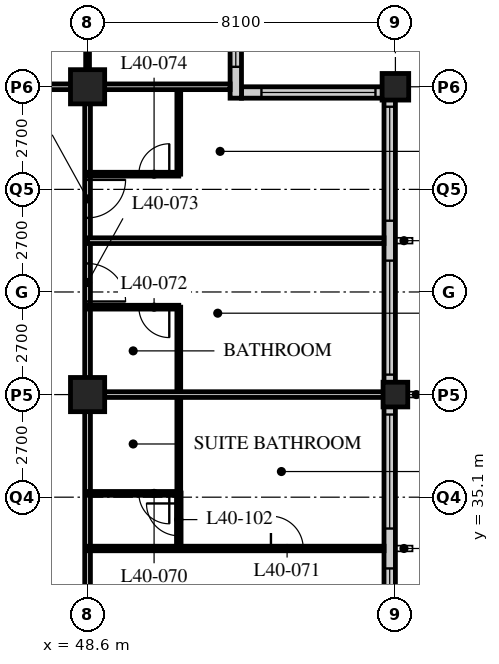
"""IFC4 building model, lengths in metres.
Left out: names, types, materials, properties, quantities, classifications, styles, units other than length and angle.
Written with IfcOpenShell. Run it as: python <this file> out.ifc"""

import sys

from ifc_helpers import new_model, si_unit, direction, frame, frame_2d, origin, origin_2d, place, context, subcontext, project, spatial, rectangle, hollow_rectangle, extrude, element, fill, save


model = new_model("IFC4")
c1 = context("Model", 3, precision=1e-05, world=origin(), true_north=direction((0.0, 1.0)))
c2 = subcontext(c1, "Body", "Model", "MODEL_VIEW")
j1 = project(units=[si_unit("LENGTHUNIT", "METRE"), si_unit("PLANEANGLEUNIT", "RADIAN")], contexts=[c1])
p1 = place(None, origin())
s1 = spatial("IfcSite", under=j1, at=p1, CompositionType="ELEMENT")
p2 = place(p1, origin())
s2 = spatial("IfcBuilding", under=s1, at=p2, CompositionType="ELEMENT")
p3 = place(p2, frame((0.0, 0.0, 154.4)))
s3 = spatial("IfcBuildingStorey", under=s2, at=p3, CompositionType="ELEMENT", Elevation=154.4)
for number, where, z_axis, x_axis in (
    (1, (48.6, 37.8, 0.0), (0.0, 0.0, 1.0), (1.0, 0.0, 0.0)),
    (2, (48.6, 45.9, 0.0), (0.0, 0.0, 1.0), (1.0, 0.0, 0.0)),
):
    element("IfcColumn", number, at=place(p3, frame(where, z_axis=z_axis, x_axis=x_axis)), inside=s3, PredefinedType="COLUMN", context=c2, shape_type="SweptSolid", body=[
        extrude(hollow_rectangle(XDim=0.9, YDim=0.9, WallThickness=0.1, at=origin_2d()), origin(), (0.0, 0.0, 1.0), 3.4),
    ])
p4 = place(p3, frame((56.7, 37.8, 0.0), z_axis=(0.0, 0.0, 1.0), x_axis=(1.0, 0.0, 0.0)))
e3 = element("IfcColumn", 3, at=p4, inside=s3, PredefinedType="COLUMN", context=c2, shape_type="SweptSolid", body=[
    extrude(hollow_rectangle(XDim=0.65, YDim=0.65, WallThickness=0.055, at=origin_2d()), origin(), (0.0, 0.0, 1.0), 3.4),
])
p5 = place(p3, frame((56.7, 45.9, 0.0), z_axis=(0.0, 0.0, 1.0), x_axis=(1.0, 0.0, 0.0)))
e4 = element("IfcColumn", 4, at=p5, inside=s3, PredefinedType="COLUMN", context=c2, shape_type="SweptSolid", body=[
    extrude(hollow_rectangle(XDim=0.7, YDim=0.7, WallThickness=0.07, at=origin_2d()), origin(), (0.0, 0.0, 1.0), 3.4),
])
p6 = place(p3, frame((56.55, 13.8, 0.0), z_axis=(0.0, 0.0, 1.0), x_axis=(0.0, 1.0, 0.0)))
e5 = element("IfcWall", 5, at=p6, inside=s3, PredefinedType="SOLIDWALL", context=c2, shape_type="SweptSolid", body=[
    extrude(rectangle(XDim=32.1, YDim=0.3, at=frame_2d((16.05, 0.0))), origin(), (0.0, 0.0, 1.0), 2.15),
])
p7 = place(p6, frame((0.225, 0.0, 0.9)))
e6 = element("IfcOpeningElement", 6, at=p7, cuts=e5, PredefinedType="OPENING", context=c2, shape_type="SweptSolid", body=[
    extrude(rectangle(XDim=3.0, YDim=1.2, at=frame_2d((1.5, 0.6))), frame((0.0, 0.16, 0.0), z_axis=(0.0, -1.0, 0.0), x_axis=(1.0, 0.0, 0.0)), (0.0, 0.0, 1.0), 0.32),
])
p8 = place(p6, frame((4.275, 0.0, 0.9)))
e7 = element("IfcOpeningElement", 7, at=p8, cuts=e5, PredefinedType="OPENING", context=c2, shape_type="SweptSolid", body=[
    extrude(rectangle(XDim=3.0, YDim=1.2, at=frame_2d((1.5, 0.6))), frame((0.0, 0.16, 0.0), z_axis=(0.0, -1.0, 0.0), x_axis=(1.0, 0.0, 0.0)), (0.0, 0.0, 1.0), 0.32),
])
p9 = place(p6, frame((8.325, 0.0, 0.9)))
e8 = element("IfcOpeningElement", 8, at=p9, cuts=e5, PredefinedType="OPENING", context=c2, shape_type="SweptSolid", body=[
    extrude(rectangle(XDim=3.0, YDim=1.2, at=frame_2d((1.5, 0.6))), frame((0.0, 0.16, 0.0), z_axis=(0.0, -1.0, 0.0), x_axis=(1.0, 0.0, 0.0)), (0.0, 0.0, 1.0), 0.32),
])
p10 = place(p6, frame((12.375, 0.0, 0.9)))
e9 = element("IfcOpeningElement", 9, at=p10, cuts=e5, PredefinedType="OPENING", context=c2, shape_type="SweptSolid", body=[
    extrude(rectangle(XDim=3.0, YDim=1.2, at=frame_2d((1.5, 0.6))), frame((0.0, 0.16, 0.0), z_axis=(0.0, -1.0, 0.0), x_axis=(1.0, 0.0, 0.0)), (0.0, 0.0, 1.0), 0.32),
])
p11 = place(p6, frame((16.425, 0.0, 0.9)))
e10 = element("IfcOpeningElement", 10, at=p11, cuts=e5, PredefinedType="OPENING", context=c2, shape_type="SweptSolid", body=[
    extrude(rectangle(XDim=3.0, YDim=1.2, at=frame_2d((1.5, 0.6))), frame((0.0, 0.16, 0.0), z_axis=(0.0, -1.0, 0.0), x_axis=(1.0, 0.0, 0.0)), (0.0, 0.0, 1.0), 0.32),
])
p12 = place(p6, frame((20.475, 0.0, 0.9)))
e11 = element("IfcOpeningElement", 11, at=p12, cuts=e5, PredefinedType="OPENING", context=c2, shape_type="SweptSolid", body=[
    extrude(rectangle(XDim=3.0, YDim=1.2, at=frame_2d((1.5, 0.6))), frame((0.0, 0.16, 0.0), z_axis=(0.0, -1.0, 0.0), x_axis=(1.0, 0.0, 0.0)), (0.0, 0.0, 1.0), 0.32),
])
p13 = place(p6, frame((24.525, 0.0, 0.9)))
e12 = element("IfcOpeningElement", 12, at=p13, cuts=e5, PredefinedType="OPENING", context=c2, shape_type="SweptSolid", body=[
    extrude(rectangle(XDim=3.0, YDim=1.2, at=frame_2d((1.5, 0.6))), frame((0.0, 0.16, 0.0), z_axis=(0.0, -1.0, 0.0), x_axis=(1.0, 0.0, 0.0)), (0.0, 0.0, 1.0), 0.32),
])
p14 = place(p6, frame((28.575, 0.0, 0.9)))
e13 = element("IfcOpeningElement", 13, at=p14, cuts=e5, PredefinedType="OPENING", context=c2, shape_type="SweptSolid", body=[
    extrude(rectangle(XDim=3.0, YDim=1.2, at=frame_2d((1.5, 0.6))), frame((0.0, 0.16, 0.0), z_axis=(0.0, -1.0, 0.0), x_axis=(1.0, 0.0, 0.0)), (0.0, 0.0, 1.0), 0.32),
])
p15 = place(p3, frame((56.4, 45.75, 0.0), z_axis=(0.0, 0.0, 1.0), x_axis=(-1.0, 0.0, 0.0)))
e14 = element("IfcWall", 14, at=p15, inside=s3, PredefinedType="SOLIDWALL", context=c2, shape_type="SweptSolid", body=[
    extrude(rectangle(XDim=3.75, YDim=0.3, at=frame_2d((1.875, 0.0))), origin(), (0.0, 0.0, 1.0), 2.15),
])
p16 = place(p15, frame((0.225, 0.0, 0.9)))
e15 = element("IfcOpeningElement", 15, at=p16, cuts=e14, PredefinedType="OPENING", context=c2, shape_type="SweptSolid", body=[
    extrude(rectangle(XDim=3.0, YDim=1.2, at=frame_2d((1.5, 0.6))), frame((0.0, 0.16, 0.0), z_axis=(0.0, -1.0, 0.0), x_axis=(1.0, 0.0, 0.0)), (0.0, 0.0, 1.0), 0.32),
])
p17 = place(p3, frame((52.5, 45.6, 0.0), z_axis=(0.0, 0.0, 1.0), x_axis=(0.0, 1.0, 0.0)))
e16 = element("IfcWall", 16, at=p17, inside=s3, PredefinedType="SOLIDWALL", context=c2, shape_type="SweptSolid", body=[
    extrude(rectangle(XDim=4.35, YDim=0.3, at=frame_2d((2.175, 0.0))), origin(), (0.0, 0.0, 1.0), 2.45),
])
p18 = place(p17, frame((0.825, 0.0, 0.9)))
e17 = element("IfcOpeningElement", 17, at=p18, cuts=e16, PredefinedType="OPENING", context=c2, shape_type="SweptSolid", body=[
    extrude(rectangle(XDim=3.0, YDim=1.2, at=frame_2d((1.5, 0.6))), frame((0.0, 0.16, 0.0), z_axis=(0.0, -1.0, 0.0), x_axis=(1.0, 0.0, 0.0)), (0.0, 0.0, 1.0), 0.32),
])
p19 = place(p3, frame((8.1, 45.9, 0.0), z_axis=(0.0, 0.0, 1.0), x_axis=(1.0, 0.0, 0.0)))
e18 = element("IfcWall", 18, at=p19, inside=s3, PredefinedType="PARTITIONING", context=c2, shape_type="SweptSolid", body=[
    extrude(rectangle(XDim=40.5, YDim=0.15, at=frame_2d((20.25, 0.0))), origin(), (0.0, 0.0, 1.0), 2.15),
])
p20 = place(p19, frame((9.625, 0.0, 0.0)))
e19 = element("IfcOpeningElement", 19, at=p20, cuts=e18, PredefinedType="OPENING", context=c2, shape_type="SweptSolid", body=[
    extrude(rectangle(XDim=1.0, YDim=2.1, at=frame_2d((0.5, 1.05))), frame((0.0, 0.085, 0.0), z_axis=(0.0, -1.0, 0.0), x_axis=(1.0, 0.0, 0.0)), (0.0, 0.0, 1.0), 0.17),
])
p21 = place(p19, frame((21.775, 0.0, 0.0)))
e20 = element("IfcOpeningElement", 20, at=p21, cuts=e18, PredefinedType="OPENING", context=c2, shape_type="SweptSolid", body=[
    extrude(rectangle(XDim=1.0, YDim=2.1, at=frame_2d((0.5, 1.05))), frame((0.0, 0.085, 0.0), z_axis=(0.0, -1.0, 0.0), x_axis=(1.0, 0.0, 0.0)), (0.0, 0.0, 1.0), 0.17),
])
p22 = place(p19, frame((28.95, 0.0, 0.0)))
e21 = element("IfcOpeningElement", 21, at=p22, cuts=e18, PredefinedType="OPENING", context=c2, shape_type="SweptSolid", body=[
    extrude(rectangle(XDim=1.0, YDim=2.1, at=frame_2d((0.5, 1.05))), frame((0.0, 0.085, 0.0), z_axis=(0.0, -1.0, 0.0), x_axis=(1.0, 0.0, 0.0)), (0.0, 0.0, 1.0), 0.17),
])
p23 = place(p19, frame((34.85, 0.0, 0.0)))
e22 = element("IfcOpeningElement", 22, at=p23, cuts=e18, PredefinedType="OPENING", context=c2, shape_type="SweptSolid", body=[
    extrude(rectangle(XDim=1.0, YDim=2.1, at=frame_2d((0.5, 1.05))), frame((0.0, 0.085, 0.0), z_axis=(0.0, -1.0, 0.0), x_axis=(1.0, 0.0, 0.0)), (0.0, 0.0, 1.0), 0.17),
])
p24 = place(p19, frame((36.875, 0.0, 0.0)))
e23 = element("IfcOpeningElement", 23, at=p24, cuts=e18, PredefinedType="OPENING", context=c2, shape_type="SweptSolid", body=[
    extrude(rectangle(XDim=1.0, YDim=2.1, at=frame_2d((0.5, 1.05))), frame((0.0, 0.085, 0.0), z_axis=(0.0, -1.0, 0.0), x_axis=(1.0, 0.0, 0.0)), (0.0, 0.0, 1.0), 0.17),
])
p25 = place(p19, frame((2.625, 0.0, 0.0)))
e24 = element("IfcOpeningElement", 24, at=p25, cuts=e18, PredefinedType="OPENING", context=c2, shape_type="SweptSolid", body=[
    extrude(rectangle(XDim=1.0, YDim=2.1, at=frame_2d((0.5, 1.05))), frame((0.0, 0.085, 0.0), z_axis=(0.0, -1.0, 0.0), x_axis=(1.0, 0.0, 0.0)), (0.0, 0.0, 1.0), 0.17),
])
p26 = place(p3, frame((48.6, 17.55, 0.0), z_axis=(0.0, 0.0, 1.0), x_axis=(0.0, 1.0, 0.0)))
e25 = element("IfcWall", 25, at=p26, inside=s3, PredefinedType="PARTITIONING", context=c2, shape_type="SweptSolid", body=[
    extrude(rectangle(XDim=28.35, YDim=0.15, at=frame_2d((14.175, 0.0))), origin(), (0.0, 0.0, 1.0), 2.15),
])
p27 = place(p26, frame((0.3, 0.0, 0.0)))
e26 = element("IfcOpeningElement", 26, at=p27, cuts=e25, PredefinedType="OPENING", context=c2, shape_type="SweptSolid", body=[
    extrude(rectangle(XDim=1.0, YDim=2.1, at=frame_2d((0.5, 1.05))), frame((0.0, 0.085, 0.0), z_axis=(0.0, -1.0, 0.0), x_axis=(1.0, 0.0, 0.0)), (0.0, 0.0, 1.0), 0.17),
])
p28 = place(p26, frame((6.5, 0.0, 0.0)))
e27 = element("IfcOpeningElement", 27, at=p28, cuts=e25, PredefinedType="OPENING", context=c2, shape_type="SweptSolid", body=[
    extrude(rectangle(XDim=1.0, YDim=2.1, at=frame_2d((0.5, 1.05))), frame((0.0, 0.085, 0.0), z_axis=(0.0, -1.0, 0.0), x_axis=(1.0, 0.0, 0.0)), (0.0, 0.0, 1.0), 0.17),
])
p29 = place(p26, frame((13.675, 0.0, 0.0)))
e28 = element("IfcOpeningElement", 28, at=p29, cuts=e25, PredefinedType="OPENING", context=c2, shape_type="SweptSolid", body=[
    extrude(rectangle(XDim=1.0, YDim=2.1, at=frame_2d((0.5, 1.05))), frame((0.0, 0.085, 0.0), z_axis=(0.0, -1.0, 0.0), x_axis=(1.0, 0.0, 0.0)), (0.0, 0.0, 1.0), 0.17),
])
p30 = place(p26, frame((22.7, 0.0, 0.0)))
e29 = element("IfcOpeningElement", 29, at=p30, cuts=e25, PredefinedType="OPENING", context=c2, shape_type="SweptSolid", body=[
    extrude(rectangle(XDim=1.0, YDim=2.1, at=frame_2d((0.5, 1.05))), frame((0.0, 0.085, 0.0), z_axis=(0.0, -1.0, 0.0), x_axis=(1.0, 0.0, 0.0)), (0.0, 0.0, 1.0), 0.17),
])
p31 = place(p26, frame((24.9, 0.0, 0.0)))
e30 = element("IfcOpeningElement", 30, at=p31, cuts=e25, PredefinedType="OPENING", context=c2, shape_type="SweptSolid", body=[
    extrude(rectangle(XDim=1.0, YDim=2.1, at=frame_2d((0.5, 1.05))), frame((0.0, 0.085, 0.0), z_axis=(0.0, -1.0, 0.0), x_axis=(1.0, 0.0, 0.0)), (0.0, 0.0, 1.0), 0.17),
])
p32 = place(p3, frame((51.0, 35.2, 0.0), z_axis=(0.0, 0.0, 1.0), x_axis=(0.0, 1.0, 0.0)))
e31 = element("IfcWall", 31, at=p32, inside=s3, PredefinedType="PARTITIONING", context=c2, shape_type="SweptSolid", body=[
    extrude(rectangle(XDim=4.9, YDim=0.1, at=frame_2d((2.45, 0.0))), origin(), (0.0, 0.0, 1.0), 3.15),
])
p33 = place(p3, frame((48.6, 35.2, 0.0), z_axis=(0.0, 0.0, 1.0), x_axis=(1.0, 0.0, 0.0)))
e32 = element("IfcWall", 32, at=p33, inside=s3, PredefinedType="PARTITIONING", context=c2, shape_type="SweptSolid", body=[
    extrude(rectangle(XDim=2.4, YDim=0.1, at=frame_2d((1.2, 0.0))), origin(), (0.0, 0.0, 1.0), 3.15),
])
p34 = place(p33, frame((1.35, 0.0, 0.0)))
e33 = element("IfcOpeningElement", 33, at=p34, cuts=e32, PredefinedType="OPENING", context=c2, shape_type="SweptSolid", body=[
    extrude(rectangle(XDim=0.8, YDim=2.1, at=frame_2d((0.4, 1.05))), frame((0.0, 0.06, 0.0), z_axis=(0.0, -1.0, 0.0), x_axis=(1.0, 0.0, 0.0)), (0.0, 0.0, 1.0), 0.12),
])
p35 = place(p3, frame((48.6, 33.75, 0.0), z_axis=(0.0, 0.0, 1.0), x_axis=(1.0, 0.0, 0.0)))
e34 = element("IfcWall", 34, at=p35, inside=s3, PredefinedType="PARTITIONING", context=c2, shape_type="SweptSolid", body=[
    extrude(rectangle(XDim=7.8, YDim=0.12, at=frame_2d((3.9, 0.0))), origin(), (0.0, 0.0, 1.0), 3.15),
])
p36 = place(p35, frame((4.825, 0.0, 0.0)))
e35 = element("IfcOpeningElement", 35, at=p36, cuts=e34, PredefinedType="OPENING", context=c2, shape_type="SweptSolid", body=[
    extrude(rectangle(XDim=0.85, YDim=2.1, at=frame_2d((0.425, 1.05))), frame((0.0, 0.07, 0.0), z_axis=(0.0, -1.0, 0.0), x_axis=(1.0, 0.0, 0.0)), (0.0, 0.0, 1.0), 0.14),
])
p37 = place(p3, frame((48.6, 37.8, 0.0), z_axis=(0.0, 0.0, 1.0), x_axis=(1.0, 0.0, 0.0)))
e36 = element("IfcWall", 36, at=p37, inside=s3, PredefinedType="PARTITIONING", context=c2, shape_type="SweptSolid", body=[
    extrude(rectangle(XDim=7.8, YDim=0.15, at=frame_2d((3.9, 0.0))), origin(), (0.0, 0.0, 1.0), 2.38),
])
p38 = place(p3, frame((48.6, 40.1, 0.0), z_axis=(0.0, 0.0, 1.0), x_axis=(1.0, 0.0, 0.0)))
e37 = element("IfcWall", 37, at=p38, inside=s3, PredefinedType="PARTITIONING", context=c2, shape_type="SweptSolid", body=[
    extrude(rectangle(XDim=2.4, YDim=0.1, at=frame_2d((1.2, 0.0))), origin(), (0.0, 0.0, 1.0), 3.15),
])
p39 = place(p38, frame((1.35, 0.0, 0.0)))
e38 = element("IfcOpeningElement", 38, at=p39, cuts=e37, PredefinedType="OPENING", context=c2, shape_type="SweptSolid", body=[
    extrude(rectangle(XDim=0.8, YDim=2.1, at=frame_2d((0.4, 1.05))), frame((0.0, 0.06, 0.0), z_axis=(0.0, -1.0, 0.0), x_axis=(1.0, 0.0, 0.0)), (0.0, 0.0, 1.0), 0.12),
])
p40 = place(p3, frame((48.6, 41.85, 0.0), z_axis=(0.0, 0.0, 1.0), x_axis=(1.0, 0.0, 0.0)))
e39 = element("IfcWall", 39, at=p40, inside=s3, PredefinedType="PARTITIONING", context=c2, shape_type="SweptSolid", body=[
    extrude(rectangle(XDim=7.8, YDim=0.15, at=frame_2d((3.9, 0.0))), origin(), (0.0, 0.0, 1.0), 3.15),
])
p41 = place(p3, frame((51.0, 43.6, 0.0), z_axis=(0.0, 0.0, 1.0), x_axis=(0.0, 1.0, 0.0)))
e40 = element("IfcWall", 40, at=p41, inside=s3, PredefinedType="PARTITIONING", context=c2, shape_type="SweptSolid", body=[
    extrude(rectangle(XDim=2.3, YDim=0.1, at=frame_2d((1.15, 0.0))), origin(), (0.0, 0.0, 1.0), 3.15),
])
p42 = place(p3, frame((48.6, 43.6, 0.0), z_axis=(0.0, 0.0, 1.0), x_axis=(1.0, 0.0, 0.0)))
e41 = element("IfcWall", 41, at=p42, inside=s3, PredefinedType="PARTITIONING", context=c2, shape_type="SweptSolid", body=[
    extrude(rectangle(XDim=2.4, YDim=0.1, at=frame_2d((1.2, 0.0))), origin(), (0.0, 0.0, 1.0), 3.15),
])
p43 = place(p42, frame((1.35, 0.0, 0.0)))
e42 = element("IfcOpeningElement", 42, at=p43, cuts=e41, PredefinedType="OPENING", context=c2, shape_type="SweptSolid", body=[
    extrude(rectangle(XDim=0.8, YDim=2.1, at=frame_2d((0.4, 1.05))), frame((0.0, 0.06, 0.0), z_axis=(0.0, -1.0, 0.0), x_axis=(1.0, 0.0, 0.0)), (0.0, 0.0, 1.0), 0.12),
])
p44 = place(p3, frame((48.6, 45.9, 0.0), z_axis=(0.0, 0.0, 1.0), x_axis=(0.0, 1.0, 0.0)))
e43 = element("IfcWall", 43, at=p44, inside=s3, PredefinedType="PARTITIONING", context=c2, shape_type="SweptSolid", body=[
    extrude(rectangle(XDim=2.4, YDim=0.1, at=frame_2d((1.2, 0.0))), origin(), (0.0, 0.0, 1.0), 2.15),
])
p45 = place(p3, frame((48.6, 45.9, 0.0), z_axis=(0.0, 0.0, 1.0), x_axis=(1.0, 0.0, 0.0)))
e44 = element("IfcWall", 44, at=p45, inside=s3, PredefinedType="PARTITIONING", context=c2, shape_type="SweptSolid", body=[
    extrude(rectangle(XDim=3.75, YDim=0.15, at=frame_2d((1.875, 0.0))), origin(), (0.0, 0.0, 1.0), 2.15),
])
p46 = place(p3, frame((51.0, 35.21, 0.0), z_axis=(0.0, 0.0, 1.0), x_axis=(0.0, -1.0, 0.0)))
e45 = element("IfcWall", 45, at=p46, inside=s3, PredefinedType="PARTITIONING", context=c2, shape_type="SweptSolid", body=[
    extrude(rectangle(XDim=1.46, YDim=0.12, at=frame_2d((0.73, 0.0))), origin(), (0.0, 0.0, 1.0), 3.15),
])
p47 = place(p46, frame((0.275, 0.0, 0.0)))
e46 = element("IfcOpeningElement", 46, at=p47, cuts=e45, PredefinedType="OPENING", context=c2, shape_type="SweptSolid", body=[
    extrude(rectangle(XDim=0.85, YDim=2.1, at=frame_2d((0.425, 1.05))), frame((0.0, 0.07, 0.0), z_axis=(0.0, -1.0, 0.0), x_axis=(1.0, 0.0, 0.0)), (0.0, 0.0, 1.0), 0.14),
])
p48 = place(p11, origin())
e47 = element("IfcWindow", 47, at=p48, inside=s3, PartitioningType="SINGLE_PANEL", PredefinedType="WINDOW", context=c2, shape_type="SweptSolid", body=[
    extrude(rectangle(XDim=3.0, YDim=1.2, at=frame_2d((1.5, 0.6))), frame((0.0, 0.03, 0.0), z_axis=(0.0, -1.0, 0.0), x_axis=(1.0, 0.0, 0.0)), (0.0, 0.0, 1.0), 0.06),
])
fill(e10, e47)
p49 = place(p12, origin())
e48 = element("IfcWindow", 48, at=p49, inside=s3, PartitioningType="SINGLE_PANEL", PredefinedType="WINDOW", context=c2, shape_type="SweptSolid", body=[
    extrude(rectangle(XDim=3.0, YDim=1.2, at=frame_2d((1.5, 0.6))), frame((0.0, 0.03, 0.0), z_axis=(0.0, -1.0, 0.0), x_axis=(1.0, 0.0, 0.0)), (0.0, 0.0, 1.0), 0.06),
])
fill(e11, e48)
p50 = place(p13, origin())
e49 = element("IfcWindow", 49, at=p50, inside=s3, PartitioningType="SINGLE_PANEL", PredefinedType="WINDOW", context=c2, shape_type="SweptSolid", body=[
    extrude(rectangle(XDim=3.0, YDim=1.2, at=frame_2d((1.5, 0.6))), frame((0.0, 0.03, 0.0), z_axis=(0.0, -1.0, 0.0), x_axis=(1.0, 0.0, 0.0)), (0.0, 0.0, 1.0), 0.06),
])
fill(e12, e49)
p51 = place(p14, origin())
e50 = element("IfcWindow", 50, at=p51, inside=s3, PartitioningType="SINGLE_PANEL", PredefinedType="WINDOW", context=c2, shape_type="SweptSolid", body=[
    extrude(rectangle(XDim=3.0, YDim=1.2, at=frame_2d((1.5, 0.6))), frame((0.0, 0.03, 0.0), z_axis=(0.0, -1.0, 0.0), x_axis=(1.0, 0.0, 0.0)), (0.0, 0.0, 1.0), 0.06),
])
fill(e13, e50)
p52 = place(p16, origin())
e51 = element("IfcWindow", 51, at=p52, inside=s3, PartitioningType="SINGLE_PANEL", PredefinedType="WINDOW", context=c2, shape_type="SweptSolid", body=[
    extrude(rectangle(XDim=3.0, YDim=1.2, at=frame_2d((1.5, 0.6))), frame((0.0, 0.03, 0.0), z_axis=(0.0, -1.0, 0.0), x_axis=(1.0, 0.0, 0.0)), (0.0, 0.0, 1.0), 0.06),
])
fill(e15, e51)
p53 = place(p18, origin())
e52 = element("IfcWindow", 52, at=p53, inside=s3, PartitioningType="SINGLE_PANEL", PredefinedType="WINDOW", context=c2, shape_type="SweptSolid", body=[
    extrude(rectangle(XDim=3.0, YDim=1.2, at=frame_2d((1.5, 0.6))), frame((0.0, 0.03, 0.0), z_axis=(0.0, -1.0, 0.0), x_axis=(1.0, 0.0, 0.0)), (0.0, 0.0, 1.0), 0.06),
])
fill(e17, e52)
p54 = place(p34, origin())
e53 = element("IfcDoor", 53, at=p54, inside=s3, OperationType="SINGLE_SWING_LEFT", PredefinedType="DOOR", context=c2, shape_type="SweptSolid", body=[
    extrude(rectangle(XDim=0.8, YDim=2.1, at=frame_2d((0.4, 1.05))), frame((0.0, 0.025, 0.0), z_axis=(0.0, -1.0, 0.0), x_axis=(1.0, 0.0, 0.0)), (0.0, 0.0, 1.0), 0.05),
])
fill(e33, e53)
p55 = place(p36, origin())
e54 = element("IfcDoor", 54, at=p55, inside=s3, OperationType="SINGLE_SWING_LEFT", PredefinedType="DOOR", context=c2, shape_type="SweptSolid", body=[
    extrude(rectangle(XDim=0.85, YDim=2.1, at=frame_2d((0.425, 1.05))), frame((0.0, 0.025, 0.0), z_axis=(0.0, -1.0, 0.0), x_axis=(1.0, 0.0, 0.0)), (0.0, 0.0, 1.0), 0.05),
])
fill(e35, e54)
p56 = place(p39, origin())
e55 = element("IfcDoor", 55, at=p56, inside=s3, OperationType="SINGLE_SWING_LEFT", PredefinedType="DOOR", context=c2, shape_type="SweptSolid", body=[
    extrude(rectangle(XDim=0.8, YDim=2.1, at=frame_2d((0.4, 1.05))), frame((0.0, 0.025, 0.0), z_axis=(0.0, -1.0, 0.0), x_axis=(1.0, 0.0, 0.0)), (0.0, 0.0, 1.0), 0.05),
])
fill(e38, e55)
p57 = place(p30, origin())
e56 = element("IfcDoor", 56, at=p57, inside=s3, OperationType="SINGLE_SWING_RIGHT", PredefinedType="DOOR", context=c2, shape_type="SweptSolid", body=[
    extrude(rectangle(XDim=1.0, YDim=2.1, at=frame_2d((0.5, 1.05))), frame((0.0, 0.025, 0.0), z_axis=(0.0, -1.0, 0.0), x_axis=(1.0, 0.0, 0.0)), (0.0, 0.0, 1.0), 0.05),
])
fill(e29, e56)
p58 = place(p43, origin())
e57 = element("IfcDoor", 57, at=p58, inside=s3, OperationType="SINGLE_SWING_RIGHT", PredefinedType="DOOR", context=c2, shape_type="SweptSolid", body=[
    extrude(rectangle(XDim=0.8, YDim=2.1, at=frame_2d((0.4, 1.05))), frame((0.0, 0.025, 0.0), z_axis=(0.0, -1.0, 0.0), x_axis=(1.0, 0.0, 0.0)), (0.0, 0.0, 1.0), 0.05),
])
fill(e42, e57)
p59 = place(p31, origin())
e58 = element("IfcDoor", 58, at=p59, inside=s3, OperationType="SINGLE_SWING_LEFT", PredefinedType="DOOR", context=c2, shape_type="SweptSolid", body=[
    extrude(rectangle(XDim=1.0, YDim=2.1, at=frame_2d((0.5, 1.05))), frame((0.0, 0.025, 0.0), z_axis=(0.0, -1.0, 0.0), x_axis=(1.0, 0.0, 0.0)), (0.0, 0.0, 1.0), 0.05),
])
fill(e30, e58)
p60 = place(p47, origin())
e59 = element("IfcDoor", 59, at=p60, inside=s3, OperationType="SINGLE_SWING_RIGHT", PredefinedType="DOOR", context=c2, shape_type="SweptSolid", body=[
    extrude(rectangle(XDim=0.85, YDim=2.1, at=frame_2d((0.425, 1.05))), frame((0.0, 0.025, 0.0), z_axis=(0.0, -1.0, 0.0), x_axis=(1.0, 0.0, 0.0)), (0.0, 0.0, 1.0), 0.05),
])
fill(e46, e59)
save(model, sys.argv[1])
